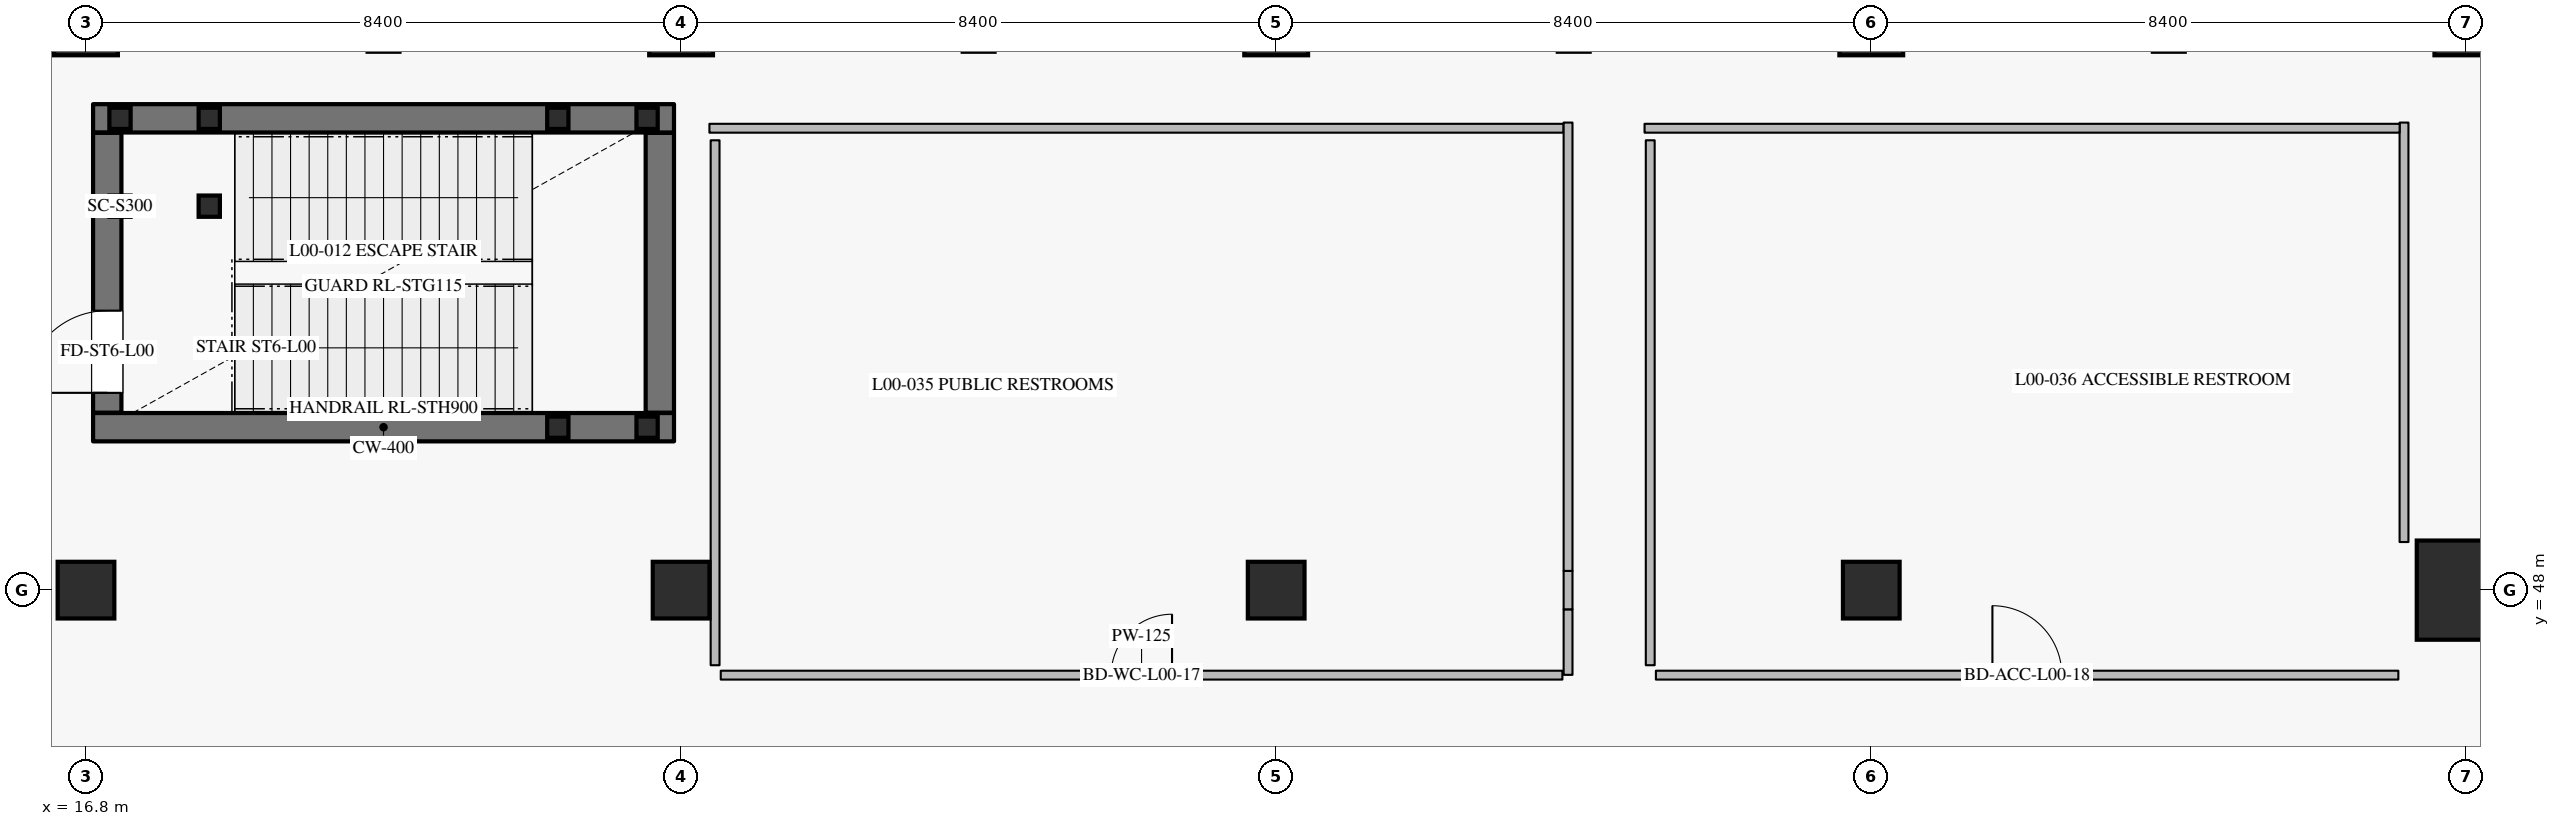
"""IFC4 building model, lengths in metres.
Left out: names, types, materials, properties, quantities, classifications, styles, units other than length and angle.
Written with IfcOpenShell. Run it as: python <this file> out.ifc"""

import sys

from ifc_helpers import new_model, si_unit, direction, frame, frame_2d, origin, origin_2d, place, context, subcontext, project, spatial, rectangle, hollow_rectangle, circle, extrude, element, fill, save


model = new_model("IFC4")
c1 = context("Model", 3, precision=1e-05, world=origin(), true_north=direction((0.0, 1.0)))
c2 = subcontext(c1, "Body", "Model", "MODEL_VIEW")
j1 = project(units=[si_unit("LENGTHUNIT", "METRE"), si_unit("PLANEANGLEUNIT", "RADIAN")], contexts=[c1])
p1 = place(None, origin())
s1 = spatial("IfcSite", under=j1, at=p1, CompositionType="ELEMENT")
p2 = place(p1, origin())
s2 = spatial("IfcBuilding", under=s1, at=p2, CompositionType="ELEMENT")
p3 = place(p2, origin())
s3 = spatial("IfcBuildingStorey", under=s2, at=p3, CompositionType="ELEMENT", Elevation=0.0)
p4 = place(p3, frame((16.8, 48.0, 0.0), z_axis=(0.0, 0.0, 1.0), x_axis=(1.0, 0.0, 0.0)))
e1 = element("IfcColumn", 1, at=p4, inside=s3, PredefinedType="COLUMN", context=c2, shape_type="SweptSolid", body=[
    extrude(rectangle(XDim=0.8, YDim=0.8, at=origin_2d()), origin(), (0.0, 0.0, 1.0), 6.0),
])
p5 = place(p3, frame((16.8, 56.0, 0.0), z_axis=(0.0, 0.0, 1.0), x_axis=(1.0, 0.0, 0.0)))
e2 = element("IfcColumn", 2, at=p5, inside=s3, PredefinedType="COLUMN", context=c2, shape_type="SweptSolid", body=[
    extrude(rectangle(XDim=0.9, YDim=0.9, at=origin_2d()), origin(), (0.0, 0.0, 1.0), 6.0),
])
p6 = place(p3, frame((25.2, 48.0, 0.0), z_axis=(0.0, 0.0, 1.0), x_axis=(1.0, 0.0, 0.0)))
e3 = element("IfcColumn", 3, at=p6, inside=s3, PredefinedType="COLUMN", context=c2, shape_type="SweptSolid", body=[
    extrude(rectangle(XDim=0.8, YDim=0.8, at=origin_2d()), origin(), (0.0, 0.0, 1.0), 6.0),
])
p7 = place(p3, frame((25.2, 56.0, 0.0), z_axis=(0.0, 0.0, 1.0), x_axis=(1.0, 0.0, 0.0)))
e4 = element("IfcColumn", 4, at=p7, inside=s3, PredefinedType="COLUMN", context=c2, shape_type="SweptSolid", body=[
    extrude(rectangle(XDim=0.9, YDim=0.9, at=origin_2d()), origin(), (0.0, 0.0, 1.0), 6.0),
])
p8 = place(p3, frame((33.6, 48.0, 0.0), z_axis=(0.0, 0.0, 1.0), x_axis=(1.0, 0.0, 0.0)))
e5 = element("IfcColumn", 5, at=p8, inside=s3, PredefinedType="COLUMN", context=c2, shape_type="SweptSolid", body=[
    extrude(rectangle(XDim=0.8, YDim=0.8, at=origin_2d()), origin(), (0.0, 0.0, 1.0), 6.0),
])
p9 = place(p3, frame((33.6, 56.0, 0.0), z_axis=(0.0, 0.0, 1.0), x_axis=(1.0, 0.0, 0.0)))
e6 = element("IfcColumn", 6, at=p9, inside=s3, PredefinedType="COLUMN", context=c2, shape_type="SweptSolid", body=[
    extrude(rectangle(XDim=0.9, YDim=0.9, at=origin_2d()), origin(), (0.0, 0.0, 1.0), 6.0),
])
p10 = place(p3, frame((42.0, 48.0, 0.0), z_axis=(0.0, 0.0, 1.0), x_axis=(1.0, 0.0, 0.0)))
e7 = element("IfcColumn", 7, at=p10, inside=s3, PredefinedType="COLUMN", context=c2, shape_type="SweptSolid", body=[
    extrude(rectangle(XDim=0.8, YDim=0.8, at=origin_2d()), origin(), (0.0, 0.0, 1.0), 6.0),
])
p11 = place(p3, frame((42.0, 56.0, 0.0), z_axis=(0.0, 0.0, 1.0), x_axis=(1.0, 0.0, 0.0)))
e8 = element("IfcColumn", 8, at=p11, inside=s3, PredefinedType="COLUMN", context=c2, shape_type="SweptSolid", body=[
    extrude(rectangle(XDim=0.9, YDim=0.9, at=origin_2d()), origin(), (0.0, 0.0, 1.0), 6.0),
])
p12 = place(p3, frame((50.4, 48.0, 0.0), z_axis=(0.0, 0.0, 1.0), x_axis=(1.0, 0.0, 0.0)))
e9 = element("IfcColumn", 9, at=p12, inside=s3, PredefinedType="COLUMN", context=c2, shape_type="SweptSolid", body=[
    extrude(circle(Radius=0.7, at=origin_2d()), origin(), (0.0, 0.0, 1.0), 6.0),
])
p13 = place(p3, frame((50.4, 56.0, 0.0), z_axis=(0.0, 0.0, 1.0), x_axis=(1.0, 0.0, 0.0)))
e10 = element("IfcColumn", 10, at=p13, inside=s3, PredefinedType="COLUMN", context=c2, shape_type="SweptSolid", body=[
    extrude(rectangle(XDim=0.9, YDim=0.9, at=origin_2d()), origin(), (0.0, 0.0, 1.0), 6.0),
])
p14 = place(p3, frame((16.9, 50.3, 0.0), z_axis=(0.0, 0.0, 1.0), x_axis=(1.0, 0.0, 0.0)))
e11 = element("IfcWall", 11, at=p14, inside=s3, PredefinedType="SHEAR", context=c2, shape_type="SweptSolid", body=[
    extrude(rectangle(XDim=8.2, YDim=0.4, at=frame_2d((4.1, 0.0))), origin(), (0.0, 0.0, 1.0), 5.675),
])
p15 = place(p3, frame((24.9, 50.505, 0.0), z_axis=(0.0, 0.0, 1.0), x_axis=(0.0, 1.0, 0.0)))
e12 = element("IfcWall", 12, at=p15, inside=s3, PredefinedType="SHEAR", context=c2, shape_type="SweptSolid", body=[
    extrude(rectangle(XDim=3.95, YDim=0.4, at=frame_2d((1.975, 0.0))), origin(), (0.0, 0.0, 1.0), 5.675),
])
p16 = place(p3, frame((16.9, 54.66, 0.0), z_axis=(0.0, 0.0, 1.0), x_axis=(1.0, 0.0, 0.0)))
e13 = element("IfcWall", 13, at=p16, inside=s3, PredefinedType="SHEAR", context=c2, shape_type="SweptSolid", body=[
    extrude(rectangle(XDim=8.2, YDim=0.4, at=frame_2d((4.1, 0.0))), origin(), (0.0, 0.0, 1.0), 5.675),
])
p17 = place(p3, frame((17.1, 50.505, 0.0), z_axis=(0.0, 0.0, 1.0), x_axis=(0.0, 1.0, 0.0)))
e14 = element("IfcWall", 14, at=p17, inside=s3, PredefinedType="SHEAR", context=c2, shape_type="SweptSolid", body=[
    extrude(rectangle(XDim=3.95, YDim=0.4, at=frame_2d((1.975, 0.0))), origin(), (0.0, 0.0, 1.0), 5.675),
])
p18 = place(p17, frame((0.28, 0.0, 0.0)))
e15 = element("IfcOpeningElement", 15, at=p18, cuts=e14, PredefinedType="OPENING", context=c2, shape_type="SweptSolid", body=[
    extrude(rectangle(XDim=1.16, YDim=2.2, at=frame_2d((0.58, 1.1))), frame((0.0, 0.21, 0.0), z_axis=(0.0, -1.0, 0.0), x_axis=(1.0, 0.0, 0.0)), (0.0, 0.0, 1.0), 0.42),
])
for number, where, z_axis, x_axis in (
    (16, (17.28, 53.42, 0.0), (0.0, 0.0, 1.0), (1.0, 0.0, 0.0)),
    (17, (17.28, 54.66, 0.0), (0.0, 0.0, 1.0), (1.0, 0.0, 0.0)),
    (18, (18.54, 53.42, 0.0), (0.0, 0.0, 1.0), (1.0, 0.0, 0.0)),
    (19, (18.54, 54.66, 0.0), (0.0, 0.0, 1.0), (1.0, 0.0, 0.0)),
):
    element("IfcColumn", number, at=place(p3, frame(where, z_axis=z_axis, x_axis=x_axis)), inside=s3, PredefinedType="COLUMN", context=c2, shape_type="SweptSolid", body=[
        extrude(hollow_rectangle(XDim=0.3, YDim=0.3, WallThickness=0.012, at=origin_2d()), origin(), (0.0, 0.0, 1.0), 5.82),
    ])
for number, where, z_axis, x_axis in (
    (20, (23.46, 50.3, -2.7), (0.0, 0.0, 1.0), (1.0, 0.0, 0.0)),
    (21, (23.46, 54.66, -2.7), (0.0, 0.0, 1.0), (1.0, 0.0, 0.0)),
    (22, (24.72, 50.3, -2.7), (0.0, 0.0, 1.0), (1.0, 0.0, 0.0)),
    (23, (24.72, 54.66, -2.7), (0.0, 0.0, 1.0), (1.0, 0.0, 0.0)),
):
    element("IfcColumn", number, at=place(p3, frame(where, z_axis=z_axis, x_axis=x_axis)), inside=s3, PredefinedType="COLUMN", context=c2, shape_type="SweptSolid", body=[
        extrude(hollow_rectangle(XDim=0.3, YDim=0.3, WallThickness=0.012, at=origin_2d()), origin(), (0.0, 0.0, 1.0), 5.52),
    ])
p19 = place(p3, frame((25.76, 46.8, 0.0), z_axis=(0.0, 0.0, 1.0), x_axis=(1.0, 0.0, 0.0)))
e24 = element("IfcWall", 24, at=p19, inside=s3, PredefinedType="PARTITIONING", context=c2, shape_type="SweptSolid", body=[
    extrude(rectangle(XDim=11.88, YDim=0.125, at=frame_2d((5.94, 0.0))), origin(), (0.0, 0.0, 1.0), 5.675),
])
p20 = place(p19, frame((5.51, 0.0, 0.0)))
e25 = element("IfcOpeningElement", 25, at=p20, cuts=e24, PredefinedType="OPENING", context=c2, shape_type="SweptSolid", body=[
    extrude(rectangle(XDim=0.86, YDim=2.12, at=frame_2d((0.43, 1.06))), frame((0.0, 0.073, 0.0), z_axis=(0.0, -1.0, 0.0), x_axis=(1.0, 0.0, 0.0)), (0.0, 0.0, 1.0), 0.145),
])
p21 = place(p3, frame((25.68, 46.94, 0.0), z_axis=(0.0, 0.0, 1.0), x_axis=(0.0, 1.0, 0.0)))
e26 = element("IfcWall", 26, at=p21, inside=s3, PredefinedType="PARTITIONING", context=c2, shape_type="SweptSolid", body=[
    extrude(rectangle(XDim=7.41, YDim=0.125, at=frame_2d((3.705, 0.0))), origin(), (0.0, 0.0, 1.0), 5.675),
])
p22 = place(p3, frame((38.96, 46.8, 0.0), z_axis=(0.0, 0.0, 1.0), x_axis=(1.0, 0.0, 0.0)))
e27 = element("IfcWall", 27, at=p22, inside=s3, PredefinedType="PARTITIONING", context=c2, shape_type="SweptSolid", body=[
    extrude(rectangle(XDim=10.48, YDim=0.125, at=frame_2d((5.24, 0.0))), origin(), (0.0, 0.0, 1.0), 5.675),
])
p23 = place(p22, frame((4.75, 0.0, 0.0)))
e28 = element("IfcOpeningElement", 28, at=p23, cuts=e27, PredefinedType="OPENING", context=c2, shape_type="SweptSolid", body=[
    extrude(rectangle(XDim=0.98, YDim=2.15, at=frame_2d((0.49, 1.075))), frame((0.0, 0.073, 0.0), z_axis=(0.0, -1.0, 0.0), x_axis=(1.0, 0.0, 0.0)), (0.0, 0.0, 1.0), 0.145),
])
p24 = place(p3, frame((38.88, 46.94, 0.0), z_axis=(0.0, 0.0, 1.0), x_axis=(0.0, 1.0, 0.0)))
e29 = element("IfcWall", 29, at=p24, inside=s3, PredefinedType="PARTITIONING", context=c2, shape_type="SweptSolid", body=[
    extrude(rectangle(XDim=7.41, YDim=0.125, at=frame_2d((3.705, 0.0))), origin(), (0.0, 0.0, 1.0), 5.675),
])
p25 = place(p3, frame((37.72, 46.804, 0.0), z_axis=(0.0, 0.0, 1.0), x_axis=(0.0, 1.0, 0.0)))
e30 = element("IfcWall", 30, at=p25, inside=s3, PredefinedType="PARTITIONING", context=c2, shape_type="SweptSolid", body=[
    extrude(rectangle(XDim=0.925, YDim=0.125, at=frame_2d((0.462, 0.0))), origin(), (0.0, 0.0, 1.0), 5.28),
])
p26 = place(p3, frame((25.6, 54.52, 0.0), z_axis=(0.0, 0.0, 1.0), x_axis=(1.0, 0.0, 0.0)))
e31 = element("IfcWall", 31, at=p26, inside=s3, PredefinedType="PARTITIONING", context=c2, shape_type="SweptSolid", body=[
    extrude(rectangle(XDim=12.057, YDim=0.125, at=frame_2d((6.028, 0.0))), origin(), (0.0, 0.0, 1.0), 5.675),
])
p27 = place(p3, frame((49.52, 48.679, 0.0), z_axis=(0.0, 0.0, 1.0), x_axis=(0.0, 1.0, 0.0)))
e32 = element("IfcWall", 32, at=p27, inside=s3, PredefinedType="PARTITIONING", context=c2, shape_type="SweptSolid", body=[
    extrude(rectangle(XDim=5.921, YDim=0.125, at=frame_2d((2.96, 0.0))), origin(), (0.0, 0.0, 1.0), 5.675),
])
p28 = place(p3, frame((38.8, 54.52, 0.0), z_axis=(0.0, 0.0, 1.0), x_axis=(1.0, 0.0, 0.0)))
e33 = element("IfcWall", 33, at=p28, inside=s3, PredefinedType="PARTITIONING", context=c2, shape_type="SweptSolid", body=[
    extrude(rectangle(XDim=10.658, YDim=0.125, at=frame_2d((5.329, 0.0))), origin(), (0.0, 0.0, 1.0), 5.675),
])
p29 = place(p3, frame((37.72, 47.729, 0.0), z_axis=(0.0, 0.0, 1.0), x_axis=(0.0, 1.0, 0.0)))
e34 = element("IfcWall", 34, at=p29, inside=s3, PredefinedType="PARTITIONING", context=c2, shape_type="SweptSolid", body=[
    extrude(rectangle(XDim=0.542, YDim=0.125, at=frame_2d((0.271, 0.0))), origin(), (0.0, 0.0, 1.0), 5.675),
])
p30 = place(p3, frame((37.72, 48.271, 0.0), z_axis=(0.0, 0.0, 1.0), x_axis=(0.0, 1.0, 0.0)))
e35 = element("IfcWall", 35, at=p30, inside=s3, PredefinedType="PARTITIONING", context=c2, shape_type="SweptSolid", body=[
    extrude(rectangle(XDim=6.329, YDim=0.125, at=frame_2d((3.165, 0.0))), origin(), (0.0, 0.0, 1.0), 5.28),
])
p31 = place(p18, origin())
e36 = element("IfcDoor", 36, at=p31, inside=s3, OperationType="SINGLE_SWING_LEFT", PredefinedType="DOOR", context=c2, shape_type="SweptSolid", body=[
    extrude(rectangle(XDim=1.16, YDim=2.2, at=frame_2d((0.58, 1.1))), frame((0.0, 0.025, 0.0), z_axis=(0.0, -1.0, 0.0), x_axis=(1.0, 0.0, 0.0)), (0.0, 0.0, 1.0), 0.05),
])
fill(e15, e36)
p32 = place(p20, origin())
e37 = element("IfcDoor", 37, at=p32, inside=s3, OperationType="SINGLE_SWING_RIGHT", PredefinedType="DOOR", context=c2, shape_type="SweptSolid", body=[
    extrude(rectangle(XDim=0.86, YDim=2.12, at=frame_2d((0.43, 1.06))), frame((0.0, 0.025, 0.0), z_axis=(0.0, -1.0, 0.0), x_axis=(1.0, 0.0, 0.0)), (0.0, 0.0, 1.0), 0.05),
])
fill(e25, e37)
p33 = place(p23, origin())
e38 = element("IfcDoor", 38, at=p33, inside=s3, OperationType="SINGLE_SWING_LEFT", PredefinedType="DOOR", context=c2, shape_type="SweptSolid", body=[
    extrude(rectangle(XDim=0.98, YDim=2.15, at=frame_2d((0.49, 1.075))), frame((0.0, 0.025, 0.0), z_axis=(0.0, -1.0, 0.0), x_axis=(1.0, 0.0, 0.0)), (0.0, 0.0, 1.0), 0.05),
])
fill(e28, e38)
save(model, sys.argv[1])
